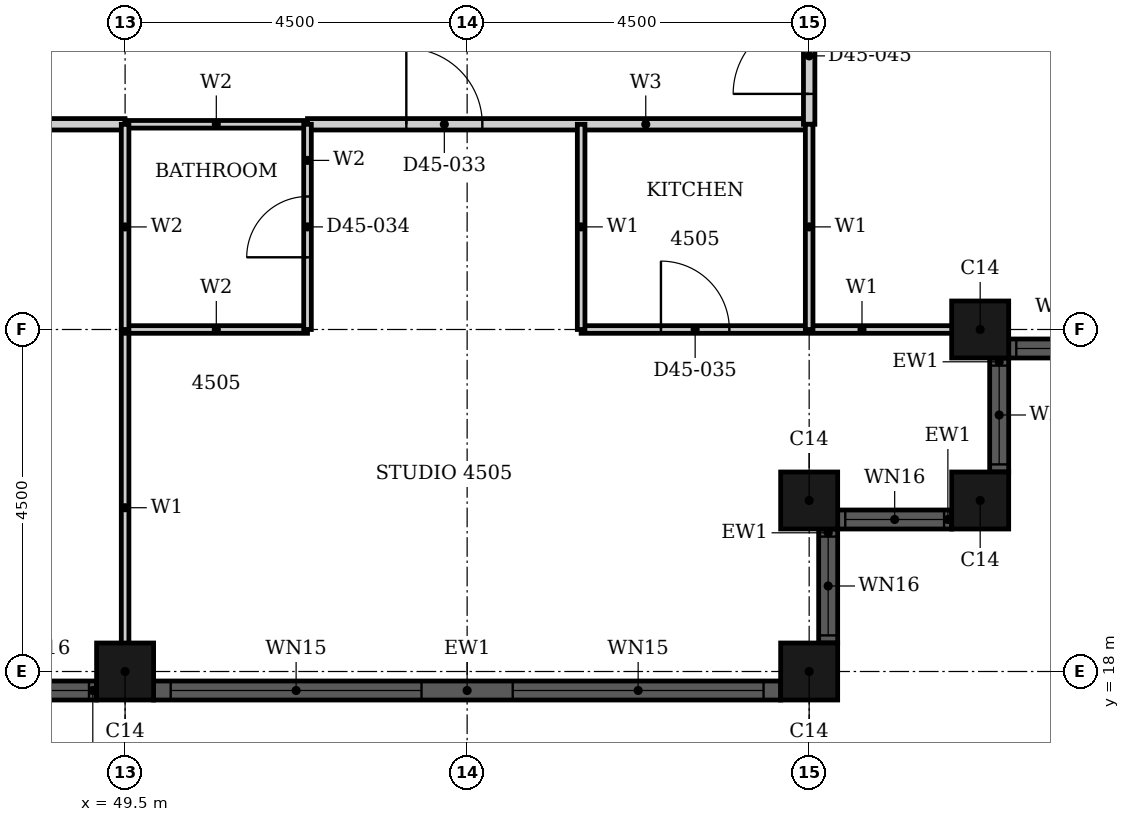
"""IFC4 building model, lengths in metres.
Left out: names, types, materials, properties, quantities, classifications, styles, units other than length and angle.
Written with IfcOpenShell. Run it as: python <this file> out.ifc"""

import sys

from ifc_helpers import new_model, si_unit, direction, frame, frame_2d, origin, origin_2d, place, context, subcontext, project, spatial, rectangle, hollow_rectangle, extrude, element, fill, save


model = new_model("IFC4")
c1 = context("Model", 3, precision=1e-05, world=origin(), true_north=direction((0.0, 1.0)))
c2 = subcontext(c1, "Body", "Model", "MODEL_VIEW")
j1 = project(units=[si_unit("LENGTHUNIT", "METRE"), si_unit("PLANEANGLEUNIT", "RADIAN")], contexts=[c1])
p1 = place(None, origin())
s1 = spatial("IfcSite", under=j1, at=p1, CompositionType="ELEMENT")
p2 = place(p1, origin())
s2 = spatial("IfcBuilding", under=s1, at=p2, CompositionType="ELEMENT")
p3 = place(p2, frame((0.0, 0.0, 180.2)))
s3 = spatial("IfcBuildingStorey", under=s2, at=p3, CompositionType="ELEMENT", Elevation=180.2)
for number, where, z_axis, x_axis in (
    (1, (49.5, 18.0, 0.0), (0.0, 0.0, 1.0), (1.0, 0.0, 0.0)),
    (2, (58.5, 18.0, 0.0), (0.0, 0.0, 1.0), (1.0, 0.0, 0.0)),
    (3, (58.5, 20.25, 0.0), (0.0, 0.0, 1.0), (1.0, 0.0, 0.0)),
    (4, (60.75, 20.25, 0.0), (0.0, 0.0, 1.0), (1.0, 0.0, 0.0)),
    (5, (60.75, 22.5, 0.0), (0.0, 0.0, 1.0), (1.0, 0.0, 0.0)),
):
    element("IfcColumn", number, at=place(p3, frame(where, z_axis=z_axis, x_axis=x_axis)), inside=s3, PredefinedType="COLUMN", context=c2, shape_type="SweptSolid", body=[
        extrude(hollow_rectangle(XDim=0.75, YDim=0.75, WallThickness=0.024, at=origin_2d()), origin(), (0.0, 0.0, 1.0), 3.7),
    ])
p4 = place(p3, frame((47.625, 17.75, 0.0), z_axis=(0.0, 0.0, 1.0), x_axis=(1.0, 0.0, 0.0)))
e6 = element("IfcWall", 6, at=p4, inside=s3, PredefinedType="SOLIDWALL", context=c2, shape_type="SweptSolid", body=[
    extrude(rectangle(XDim=1.5, YDim=0.25, at=frame_2d((0.75, 0.0))), origin(), (0.0, 0.0, 1.0), 3.7),
])
p5 = place(p4, frame((0.1, 0.0, 0.9)))
e7 = element("IfcOpeningElement", 7, at=p5, cuts=e6, PredefinedType="OPENING", context=c2, shape_type="SweptSolid", body=[
    extrude(rectangle(XDim=1.3, YDim=1.85, at=frame_2d((0.65, 0.925))), frame((0.0, 0.135, 0.0), z_axis=(0.0, -1.0, 0.0), x_axis=(1.0, 0.0, 0.0)), (0.0, 0.0, 1.0), 0.27),
])
p6 = place(p3, frame((49.875, 17.75, 0.0), z_axis=(0.0, 0.0, 1.0), x_axis=(1.0, 0.0, 0.0)))
e8 = element("IfcWall", 8, at=p6, inside=s3, PredefinedType="SOLIDWALL", context=c2, shape_type="SweptSolid", body=[
    extrude(rectangle(XDim=8.25, YDim=0.25, at=frame_2d((4.125, 0.0))), origin(), (0.0, 0.0, 1.0), 3.7),
])
p7 = place(p6, frame((0.225, 0.0, 0.45)))
e9 = element("IfcOpeningElement", 9, at=p7, cuts=e8, PredefinedType="OPENING", context=c2, shape_type="SweptSolid", body=[
    extrude(rectangle(XDim=3.3, YDim=2.3, at=frame_2d((1.65, 1.15))), frame((0.0, 0.135, 0.0), z_axis=(0.0, -1.0, 0.0), x_axis=(1.0, 0.0, 0.0)), (0.0, 0.0, 1.0), 0.27),
])
p8 = place(p6, frame((4.725, 0.0, 0.45)))
e10 = element("IfcOpeningElement", 10, at=p8, cuts=e8, PredefinedType="OPENING", context=c2, shape_type="SweptSolid", body=[
    extrude(rectangle(XDim=3.3, YDim=2.3, at=frame_2d((1.65, 1.15))), frame((0.0, 0.135, 0.0), z_axis=(0.0, -1.0, 0.0), x_axis=(1.0, 0.0, 0.0)), (0.0, 0.0, 1.0), 0.27),
])
p9 = place(p3, frame((58.75, 18.375, 0.0), z_axis=(0.0, 0.0, 1.0), x_axis=(0.0, 1.0, 0.0)))
e11 = element("IfcWall", 11, at=p9, inside=s3, PredefinedType="SOLIDWALL", context=c2, shape_type="SweptSolid", body=[
    extrude(rectangle(XDim=1.5, YDim=0.25, at=frame_2d((0.75, 0.0))), origin(), (0.0, 0.0, 1.0), 3.7),
])
p10 = place(p9, frame((0.1, 0.0, 0.9)))
e12 = element("IfcOpeningElement", 12, at=p10, cuts=e11, PredefinedType="OPENING", context=c2, shape_type="SweptSolid", body=[
    extrude(rectangle(XDim=1.3, YDim=1.85, at=frame_2d((0.65, 0.925))), frame((0.0, 0.135, 0.0), z_axis=(0.0, -1.0, 0.0), x_axis=(1.0, 0.0, 0.0)), (0.0, 0.0, 1.0), 0.27),
])
p11 = place(p3, frame((58.875, 20.0, 0.0), z_axis=(0.0, 0.0, 1.0), x_axis=(1.0, 0.0, 0.0)))
e13 = element("IfcWall", 13, at=p11, inside=s3, PredefinedType="SOLIDWALL", context=c2, shape_type="SweptSolid", body=[
    extrude(rectangle(XDim=1.5, YDim=0.25, at=frame_2d((0.75, 0.0))), origin(), (0.0, 0.0, 1.0), 3.7),
])
p12 = place(p11, frame((0.1, 0.0, 0.9)))
e14 = element("IfcOpeningElement", 14, at=p12, cuts=e13, PredefinedType="OPENING", context=c2, shape_type="SweptSolid", body=[
    extrude(rectangle(XDim=1.3, YDim=1.85, at=frame_2d((0.65, 0.925))), frame((0.0, 0.135, 0.0), z_axis=(0.0, -1.0, 0.0), x_axis=(1.0, 0.0, 0.0)), (0.0, 0.0, 1.0), 0.27),
])
p13 = place(p3, frame((61.0, 20.625, 0.0), z_axis=(0.0, 0.0, 1.0), x_axis=(0.0, 1.0, 0.0)))
e15 = element("IfcWall", 15, at=p13, inside=s3, PredefinedType="SOLIDWALL", context=c2, shape_type="SweptSolid", body=[
    extrude(rectangle(XDim=1.5, YDim=0.25, at=frame_2d((0.75, 0.0))), origin(), (0.0, 0.0, 1.0), 3.7),
])
p14 = place(p13, frame((0.1, 0.0, 0.9)))
e16 = element("IfcOpeningElement", 16, at=p14, cuts=e15, PredefinedType="OPENING", context=c2, shape_type="SweptSolid", body=[
    extrude(rectangle(XDim=1.3, YDim=1.85, at=frame_2d((0.65, 0.925))), frame((0.0, 0.135, 0.0), z_axis=(0.0, -1.0, 0.0), x_axis=(1.0, 0.0, 0.0)), (0.0, 0.0, 1.0), 0.27),
])
p15 = place(p3, frame((61.125, 22.25, 0.0), z_axis=(0.0, 0.0, 1.0), x_axis=(1.0, 0.0, 0.0)))
e17 = element("IfcWall", 17, at=p15, inside=s3, PredefinedType="SOLIDWALL", context=c2, shape_type="SweptSolid", body=[
    extrude(rectangle(XDim=1.5, YDim=0.25, at=frame_2d((0.75, 0.0))), origin(), (0.0, 0.0, 1.0), 3.7),
])
p16 = place(p15, frame((0.1, 0.0, 0.9)))
e18 = element("IfcOpeningElement", 18, at=p16, cuts=e17, PredefinedType="OPENING", context=c2, shape_type="SweptSolid", body=[
    extrude(rectangle(XDim=1.3, YDim=1.85, at=frame_2d((0.65, 0.925))), frame((0.0, 0.135, 0.0), z_axis=(0.0, -1.0, 0.0), x_axis=(1.0, 0.0, 0.0)), (0.0, 0.0, 1.0), 0.27),
])
p17 = place(p3, frame((51.9, 25.2, 0.0), z_axis=(0.0, 0.0, 1.0), x_axis=(1.0, 0.0, 0.0)))
e19 = element("IfcWall", 19, at=p17, inside=s3, PredefinedType="PARTITIONING", context=c2, shape_type="SweptSolid", body=[
    extrude(rectangle(XDim=6.6, YDim=0.15, at=frame_2d((3.3, 0.0))), origin(), (0.0, 0.0, 1.0), 3.4),
])
p18 = place(p17, frame((1.3, 0.0, 0.0)))
e20 = element("IfcOpeningElement", 20, at=p18, cuts=e19, PredefinedType="OPENING", context=c2, shape_type="SweptSolid", body=[
    extrude(rectangle(XDim=1.0, YDim=2.2, at=frame_2d((0.5, 1.1))), frame((0.0, 0.085, 0.0), z_axis=(0.0, -1.0, 0.0), x_axis=(1.0, 0.0, 0.0)), (0.0, 0.0, 1.0), 0.17),
])
p19 = place(p3, frame((46.801, 25.2, 0.0), z_axis=(0.0, 0.0, 1.0), x_axis=(1.0, 0.0, 0.0)))
e21 = element("IfcWall", 21, at=p19, inside=s3, PredefinedType="PARTITIONING", context=c2, shape_type="SweptSolid", body=[
    extrude(rectangle(XDim=2.698, YDim=0.15, at=frame_2d((1.349, 0.0))), origin(), (0.0, 0.0, 1.0), 3.4),
])
p20 = place(p3, frame((58.5, 25.2, 0.0), z_axis=(0.0, 0.0, 1.0), x_axis=(0.0, 1.0, 0.0)))
e22 = element("IfcWall", 22, at=p20, inside=s3, PredefinedType="PARTITIONING", context=c2, shape_type="SweptSolid", body=[
    extrude(rectangle(XDim=1.8, YDim=0.15, at=frame_2d((0.9, 0.0))), origin(), (0.0, 0.0, 1.0), 3.4),
])
p21 = place(p20, frame((0.4, 0.0, 0.0)))
e23 = element("IfcOpeningElement", 23, at=p21, cuts=e22, PredefinedType="OPENING", context=c2, shape_type="SweptSolid", body=[
    extrude(rectangle(XDim=1.0, YDim=2.1, at=frame_2d((0.5, 1.05))), frame((0.0, 0.085, 0.0), z_axis=(0.0, -1.0, 0.0), x_axis=(1.0, 0.0, 0.0)), (0.0, 0.0, 1.0), 0.17),
])
p22 = place(p3, frame((55.5, 22.5, 0.0), z_axis=(0.0, 0.0, 1.0), x_axis=(1.0, 0.0, 0.0)))
e24 = element("IfcWall", 24, at=p22, inside=s3, PredefinedType="PARTITIONING", context=c2, shape_type="SweptSolid", body=[
    extrude(rectangle(XDim=5.44, YDim=0.1, at=frame_2d((2.72, 0.0))), origin(), (0.0, 0.0, 1.0), 2.68),
])
p23 = place(p22, frame((1.05, 0.0, 0.0)))
e25 = element("IfcOpeningElement", 25, at=p23, cuts=e24, PredefinedType="OPENING", context=c2, shape_type="SweptSolid", body=[
    extrude(rectangle(XDim=0.9, YDim=2.1, at=frame_2d((0.45, 1.05))), frame((0.0, 0.06, 0.0), z_axis=(0.0, -1.0, 0.0), x_axis=(1.0, 0.0, 0.0)), (0.0, 0.0, 1.0), 0.12),
])
p24 = place(p3, frame((49.5, 17.81, 0.0), z_axis=(0.0, 0.0, 1.0), x_axis=(0.0, 1.0, 0.0)))
e26 = element("IfcWall", 26, at=p24, inside=s3, PredefinedType="PARTITIONING", context=c2, shape_type="SweptSolid", body=[
    extrude(rectangle(XDim=4.69, YDim=0.1, at=frame_2d((2.345, 0.0))), origin(), (0.0, 0.0, 1.0), 2.48),
])
for number, where, z_axis, x_axis in (
    (27, (55.5, 22.5, 0.0), (0.0, 0.0, 1.0), (0.0, 1.0, 0.0)),
    (28, (58.5, 22.5, 0.0), (0.0, 0.0, 1.0), (0.0, 1.0, 0.0)),
):
    element("IfcWall", number, at=place(p3, frame(where, z_axis=z_axis, x_axis=x_axis)), inside=s3, PredefinedType="PARTITIONING", context=c2, shape_type="SweptSolid", body=[
        extrude(rectangle(XDim=2.7, YDim=0.1, at=frame_2d((1.35, 0.0))), origin(), (0.0, 0.0, 1.0), 3.4),
    ])
p25 = place(p3, frame((49.5, 22.5, 0.0), z_axis=(0.0, 0.0, 1.0), x_axis=(1.0, 0.0, 0.0)))
e29 = element("IfcWall", 29, at=p25, inside=s3, PredefinedType="PARTITIONING", context=c2, shape_type="SweptSolid", body=[
    extrude(rectangle(XDim=2.4, YDim=0.1, at=frame_2d((1.2, 0.0))), origin(), (0.0, 0.0, 1.0), 2.68),
])
p26 = place(p3, frame((49.5, 25.2, 0.0), z_axis=(0.0, 0.0, 1.0), x_axis=(1.0, 0.0, 0.0)))
e30 = element("IfcWall", 30, at=p26, inside=s3, PredefinedType="PARTITIONING", context=c2, shape_type="SweptSolid", body=[
    extrude(rectangle(XDim=2.4, YDim=0.1, at=frame_2d((1.2, 0.0))), origin(), (0.0, 0.0, 1.0), 3.4),
])
p27 = place(p3, frame((49.5, 22.5, 0.0), z_axis=(0.0, 0.0, 1.0), x_axis=(0.0, 1.0, 0.0)))
e31 = element("IfcWall", 31, at=p27, inside=s3, PredefinedType="PARTITIONING", context=c2, shape_type="SweptSolid", body=[
    extrude(rectangle(XDim=2.699, YDim=0.1, at=frame_2d((1.35, 0.0))), origin(), (0.0, 0.0, 1.0), 2.48),
])
p28 = place(p3, frame((51.9, 22.5, 0.0), z_axis=(0.0, 0.0, 1.0), x_axis=(0.0, 1.0, 0.0)))
e32 = element("IfcWall", 32, at=p28, inside=s3, PredefinedType="PARTITIONING", context=c2, shape_type="SweptSolid", body=[
    extrude(rectangle(XDim=2.7, YDim=0.1, at=frame_2d((1.35, 0.0))), origin(), (0.0, 0.0, 1.0), 3.4),
])
p29 = place(p28, frame((0.95, 0.0, 0.0)))
e33 = element("IfcOpeningElement", 33, at=p29, cuts=e32, PredefinedType="OPENING", context=c2, shape_type="SweptSolid", body=[
    extrude(rectangle(XDim=0.8, YDim=2.1, at=frame_2d((0.4, 1.05))), frame((0.0, 0.06, 0.0), z_axis=(0.0, -1.0, 0.0), x_axis=(1.0, 0.0, 0.0)), (0.0, 0.0, 1.0), 0.12),
])
p30 = place(p5, origin())
e34 = element("IfcWindow", 34, at=p30, inside=s3, PartitioningType="SINGLE_PANEL", PredefinedType="WINDOW", context=c2, shape_type="SweptSolid", body=[
    extrude(rectangle(XDim=1.3, YDim=1.85, at=frame_2d((0.65, 0.925))), frame((0.0, 0.03, 0.0), z_axis=(0.0, -1.0, 0.0), x_axis=(1.0, 0.0, 0.0)), (0.0, 0.0, 1.0), 0.06),
])
fill(e7, e34)
p31 = place(p7, origin())
e35 = element("IfcWindow", 35, at=p31, inside=s3, PartitioningType="SINGLE_PANEL", PredefinedType="WINDOW", context=c2, shape_type="SweptSolid", body=[
    extrude(rectangle(XDim=3.3, YDim=2.3, at=frame_2d((1.65, 1.15))), frame((0.0, 0.03, 0.0), z_axis=(0.0, -1.0, 0.0), x_axis=(1.0, 0.0, 0.0)), (0.0, 0.0, 1.0), 0.06),
])
fill(e9, e35)
p32 = place(p8, origin())
e36 = element("IfcWindow", 36, at=p32, inside=s3, PartitioningType="SINGLE_PANEL", PredefinedType="WINDOW", context=c2, shape_type="SweptSolid", body=[
    extrude(rectangle(XDim=3.3, YDim=2.3, at=frame_2d((1.65, 1.15))), frame((0.0, 0.03, 0.0), z_axis=(0.0, -1.0, 0.0), x_axis=(1.0, 0.0, 0.0)), (0.0, 0.0, 1.0), 0.06),
])
fill(e10, e36)
p33 = place(p10, origin())
e37 = element("IfcWindow", 37, at=p33, inside=s3, PartitioningType="SINGLE_PANEL", PredefinedType="WINDOW", context=c2, shape_type="SweptSolid", body=[
    extrude(rectangle(XDim=1.3, YDim=1.85, at=frame_2d((0.65, 0.925))), frame((0.0, 0.03, 0.0), z_axis=(0.0, -1.0, 0.0), x_axis=(1.0, 0.0, 0.0)), (0.0, 0.0, 1.0), 0.06),
])
fill(e12, e37)
p34 = place(p12, origin())
e38 = element("IfcWindow", 38, at=p34, inside=s3, PartitioningType="SINGLE_PANEL", PredefinedType="WINDOW", context=c2, shape_type="SweptSolid", body=[
    extrude(rectangle(XDim=1.3, YDim=1.85, at=frame_2d((0.65, 0.925))), frame((0.0, 0.03, 0.0), z_axis=(0.0, -1.0, 0.0), x_axis=(1.0, 0.0, 0.0)), (0.0, 0.0, 1.0), 0.06),
])
fill(e14, e38)
p35 = place(p14, origin())
e39 = element("IfcWindow", 39, at=p35, inside=s3, PartitioningType="SINGLE_PANEL", PredefinedType="WINDOW", context=c2, shape_type="SweptSolid", body=[
    extrude(rectangle(XDim=1.3, YDim=1.85, at=frame_2d((0.65, 0.925))), frame((0.0, 0.03, 0.0), z_axis=(0.0, -1.0, 0.0), x_axis=(1.0, 0.0, 0.0)), (0.0, 0.0, 1.0), 0.06),
])
fill(e16, e39)
p36 = place(p16, origin())
e40 = element("IfcWindow", 40, at=p36, inside=s3, PartitioningType="SINGLE_PANEL", PredefinedType="WINDOW", context=c2, shape_type="SweptSolid", body=[
    extrude(rectangle(XDim=1.3, YDim=1.85, at=frame_2d((0.65, 0.925))), frame((0.0, 0.03, 0.0), z_axis=(0.0, -1.0, 0.0), x_axis=(1.0, 0.0, 0.0)), (0.0, 0.0, 1.0), 0.06),
])
fill(e18, e40)
p37 = place(p18, origin())
e41 = element("IfcDoor", 41, at=p37, inside=s3, OperationType="SINGLE_SWING_LEFT", PredefinedType="DOOR", context=c2, shape_type="SweptSolid", body=[
    extrude(rectangle(XDim=1.0, YDim=2.2, at=frame_2d((0.5, 1.1))), frame((0.0, 0.025, 0.0), z_axis=(0.0, -1.0, 0.0), x_axis=(1.0, 0.0, 0.0)), (0.0, 0.0, 1.0), 0.05),
])
fill(e20, e41)
p38 = place(p29, origin())
e42 = element("IfcDoor", 42, at=p38, inside=s3, OperationType="SINGLE_SWING_LEFT", PredefinedType="DOOR", context=c2, shape_type="SweptSolid", body=[
    extrude(rectangle(XDim=0.8, YDim=2.1, at=frame_2d((0.4, 1.05))), frame((0.0, 0.025, 0.0), z_axis=(0.0, -1.0, 0.0), x_axis=(1.0, 0.0, 0.0)), (0.0, 0.0, 1.0), 0.05),
])
fill(e33, e42)
p39 = place(p23, origin())
e43 = element("IfcDoor", 43, at=p39, inside=s3, OperationType="SINGLE_SWING_RIGHT", PredefinedType="DOOR", context=c2, shape_type="SweptSolid", body=[
    extrude(rectangle(XDim=0.9, YDim=2.1, at=frame_2d((0.45, 1.05))), frame((0.0, 0.025, 0.0), z_axis=(0.0, -1.0, 0.0), x_axis=(1.0, 0.0, 0.0)), (0.0, 0.0, 1.0), 0.05),
])
fill(e25, e43)
p40 = place(p21, origin())
e44 = element("IfcDoor", 44, at=p40, inside=s3, OperationType="SINGLE_SWING_RIGHT", PredefinedType="DOOR", context=c2, shape_type="SweptSolid", body=[
    extrude(rectangle(XDim=1.0, YDim=2.1, at=frame_2d((0.5, 1.05))), frame((0.0, 0.025, 0.0), z_axis=(0.0, -1.0, 0.0), x_axis=(1.0, 0.0, 0.0)), (0.0, 0.0, 1.0), 0.05),
])
fill(e23, e44)
save(model, sys.argv[1])
